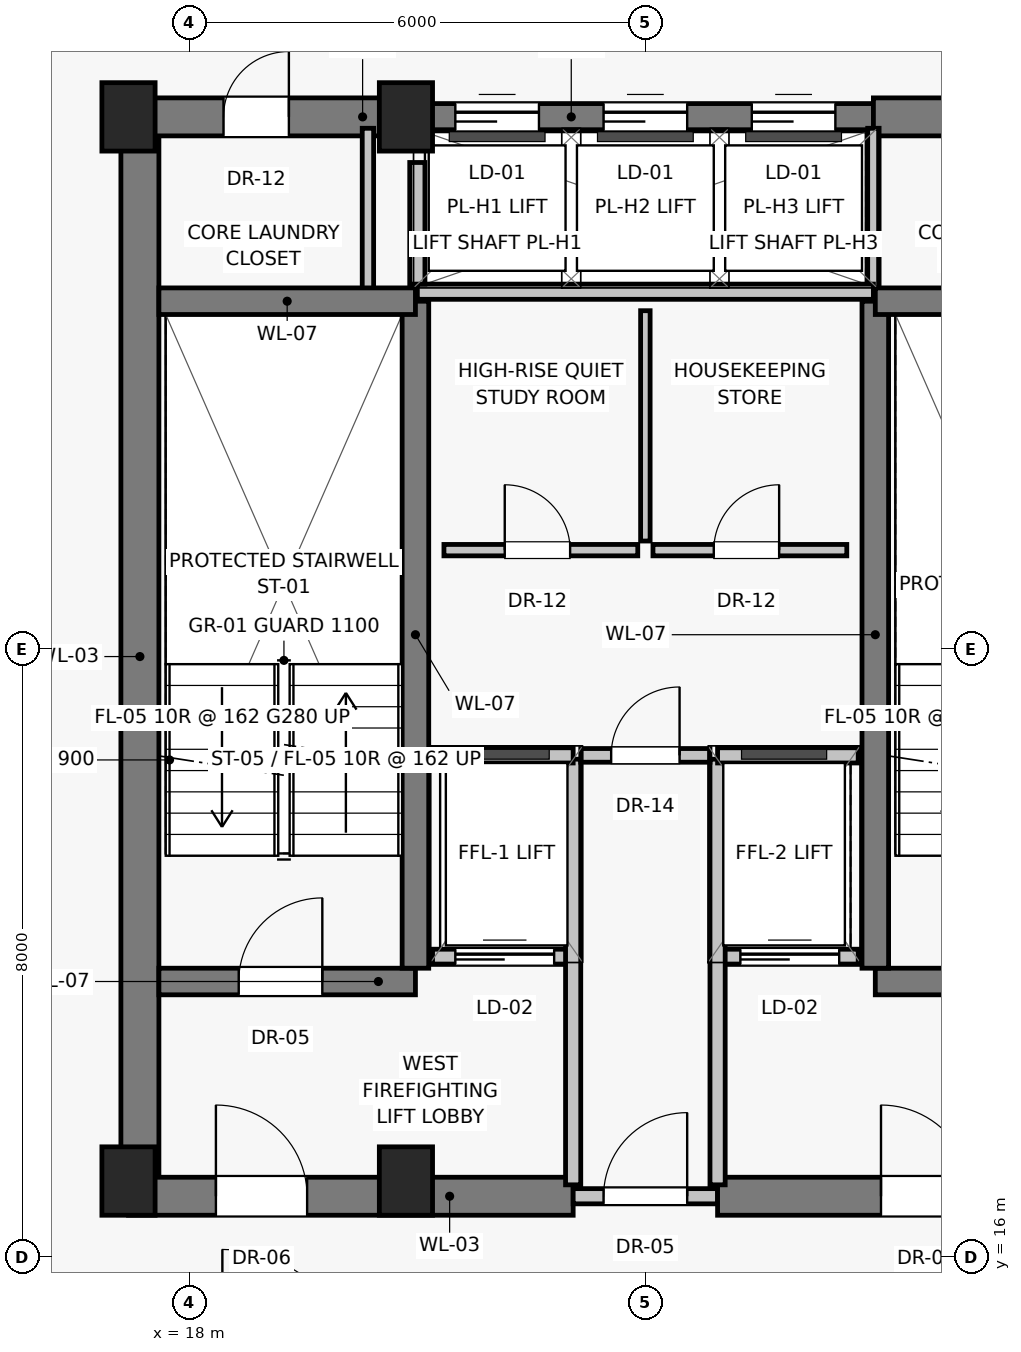
"""IFC4 building model, lengths in metres.
Left out: names, types, materials, properties, quantities, classifications, styles, units other than length and angle.
Written with IfcOpenShell. Run it as: python <this file> out.ifc"""

import sys

from ifc_helpers import new_model, si_unit, direction, frame, frame_2d, origin, origin_2d, place, context, subcontext, project, spatial, rectangle, extrude, source, transform, mapped, element, fill, save


model = new_model("IFC4")
c1 = context("Model", 3, precision=1e-05, world=origin(), true_north=direction((0.0, 1.0)))
c2 = subcontext(c1, "Body", "Model", "MODEL_VIEW")
j1 = project(units=[si_unit("LENGTHUNIT", "METRE"), si_unit("PLANEANGLEUNIT", "RADIAN")], contexts=[c1])
p1 = place(None, origin())
s1 = spatial("IfcSite", under=j1, at=p1, CompositionType="ELEMENT")
p2 = place(p1, origin())
s2 = spatial("IfcBuilding", under=s1, at=p2, CompositionType="ELEMENT")
p3 = place(p2, frame((0.0, 0.0, 251.25)))
s3 = spatial("IfcBuildingStorey", under=s2, at=p3, CompositionType="ELEMENT", Elevation=251.25)
for number, where, z_axis, x_axis in (
    (1, (17.2, 17.0, 0.0), (0.0, 0.0, 1.0), (1.0, 0.0, 0.0)),
    (2, (20.85, 17.0, 0.0), (0.0, 0.0, 1.0), (1.0, 0.0, 0.0)),
    (3, (17.2, 31.0, 0.0), (0.0, 0.0, 1.0), (1.0, 0.0, 0.0)),
    (4, (20.85, 31.0, 0.0), (0.0, 0.0, 1.0), (1.0, 0.0, 0.0)),
):
    element("IfcColumn", number, at=place(p3, frame(where, z_axis=z_axis, x_axis=x_axis)), inside=s3, PredefinedType="PILASTER", context=c2, shape_type="SweptSolid", body=[
        extrude(rectangle(XDim=0.7, YDim=0.9, at=origin_2d()), origin(), (0.0, 0.0, 1.0), 3.25),
    ])
p4 = place(p3, frame((17.35, 16.8, 0.0), z_axis=(0.0, 0.0, 1.0), x_axis=(0.0, 1.0, 0.0)))
e5 = element("IfcWall", 5, at=p4, inside=s3, PredefinedType="SHEAR", context=c2, shape_type="SweptSolid", body=[
    extrude(rectangle(XDim=14.2, YDim=0.5, at=frame_2d((7.1, 0.0))), origin(), (0.0, 0.0, 1.0), 3.015),
])
p5 = place(p3, frame((17.2, 16.8, 0.0), z_axis=(0.0, 0.0, 1.0), x_axis=(1.0, 0.0, 0.0)))
e6 = element("IfcWall", 6, at=p5, inside=s3, PredefinedType="SHEAR", context=c2, shape_type="SweptSolid", body=[
    extrude(rectangle(XDim=5.85, YDim=0.5, at=frame_2d((2.925, 0.0))), origin(), (0.0, 0.0, 1.0), 3.015),
])
p6 = place(p5, frame((1.15, 0.0, 0.0)))
e7 = element("IfcOpeningElement", 7, at=p6, cuts=e6, PredefinedType="OPENING", context=c2, shape_type="SweptSolid", body=[
    extrude(rectangle(XDim=1.2, YDim=2.03, at=frame_2d((0.6, 1.015))), frame((0.0, 0.26, 0.0), z_axis=(0.0, -1.0, 0.0), x_axis=(1.0, 0.0, 0.0)), (0.0, 0.0, 1.0), 0.52),
])
p7 = place(p3, frame((23.05, 16.8, 0.0), z_axis=(0.0, 0.0, 1.0), x_axis=(1.0, 0.0, 0.0)))
e8 = element("IfcWall", 8, at=p7, inside=s3, PredefinedType="SOLIDWALL", context=c2, shape_type="SweptSolid", body=[
    extrude(rectangle(XDim=1.9, YDim=0.2, at=frame_2d((0.95, 0.0))), origin(), (0.0, 0.0, 1.0), 2.165),
])
p8 = place(p7, frame((0.4, 0.0, 0.0)))
e9 = element("IfcOpeningElement", 9, at=p8, cuts=e8, PredefinedType="OPENING", context=c2, shape_type="SweptSolid", body=[
    extrude(rectangle(XDim=1.1, YDim=2.03, at=frame_2d((0.55, 1.015))), frame((0.0, 0.11, 0.0), z_axis=(0.0, -1.0, 0.0), x_axis=(1.0, 0.0, 0.0)), (0.0, 0.0, 1.0), 0.22),
])
p9 = place(p3, frame((24.95, 16.8, 0.0), z_axis=(0.0, 0.0, 1.0), x_axis=(1.0, 0.0, 0.0)))
e10 = element("IfcWall", 10, at=p9, inside=s3, PredefinedType="SHEAR", context=c2, shape_type="SweptSolid", body=[
    extrude(rectangle(XDim=5.85, YDim=0.5, at=frame_2d((2.925, 0.0))), origin(), (0.0, 0.0, 1.0), 3.015),
])
p10 = place(p9, frame((2.15, 0.0, 0.0)))
e11 = element("IfcOpeningElement", 11, at=p10, cuts=e10, PredefinedType="OPENING", context=c2, shape_type="SweptSolid", body=[
    extrude(rectangle(XDim=1.2, YDim=2.03, at=frame_2d((0.6, 1.015))), frame((0.0, 0.26, 0.0), z_axis=(0.0, -1.0, 0.0), x_axis=(1.0, 0.0, 0.0)), (0.0, 0.0, 1.0), 0.52),
])
p11 = place(p3, frame((17.2, 31.0, 0.0), z_axis=(0.0, 0.0, 1.0), x_axis=(1.0, 0.0, 0.0)))
e12 = element("IfcWall", 12, at=p11, inside=s3, PredefinedType="SHEAR", context=c2, shape_type="SweptSolid", body=[
    extrude(rectangle(XDim=3.8, YDim=0.5, at=frame_2d((1.9, 0.0))), origin(), (0.0, 0.0, 1.0), 3.015),
])
p12 = place(p11, frame((1.25, 0.0, 0.0)))
e13 = element("IfcOpeningElement", 13, at=p12, cuts=e12, PredefinedType="OPENING", context=c2, shape_type="SweptSolid", body=[
    extrude(rectangle(XDim=0.86, YDim=2.01, at=frame_2d((0.43, 1.005))), frame((0.0, 0.26, 0.0), z_axis=(0.0, -1.0, 0.0), x_axis=(1.0, 0.0, 0.0)), (0.0, 0.0, 1.0), 0.52),
])
p13 = place(p3, frame((21.0, 31.0, 0.0), z_axis=(0.0, 0.0, 1.0), x_axis=(1.0, 0.0, 0.0)))
e14 = element("IfcWall", 14, at=p13, inside=s3, PredefinedType="SHEAR", context=c2, shape_type="SweptSolid", body=[
    extrude(rectangle(XDim=6.0, YDim=0.35, at=frame_2d((3.0, 0.0))), origin(), (0.0, 0.0, 1.0), 3.015),
])
p14 = place(p13, frame((0.5, 0.0, 0.0)))
e15 = element("IfcOpeningElement", 15, at=p14, cuts=e14, PredefinedType="OPENING", context=c2, shape_type="SweptSolid", body=[
    extrude(rectangle(XDim=1.1, YDim=2.08, at=frame_2d((0.55, 1.04))), frame((0.0, 0.185, 0.0), z_axis=(0.0, -1.0, 0.0), x_axis=(1.0, 0.0, 0.0)), (0.0, 0.0, 1.0), 0.37),
])
p15 = place(p13, frame((2.45, 0.0, 0.0)))
e16 = element("IfcOpeningElement", 16, at=p15, cuts=e14, PredefinedType="OPENING", context=c2, shape_type="SweptSolid", body=[
    extrude(rectangle(XDim=1.1, YDim=2.08, at=frame_2d((0.55, 1.04))), frame((0.0, 0.185, 0.0), z_axis=(0.0, -1.0, 0.0), x_axis=(1.0, 0.0, 0.0)), (0.0, 0.0, 1.0), 0.37),
])
p16 = place(p13, frame((4.4, 0.0, 0.0)))
e17 = element("IfcOpeningElement", 17, at=p16, cuts=e14, PredefinedType="OPENING", context=c2, shape_type="SweptSolid", body=[
    extrude(rectangle(XDim=1.1, YDim=2.08, at=frame_2d((0.55, 1.04))), frame((0.0, 0.185, 0.0), z_axis=(0.0, -1.0, 0.0), x_axis=(1.0, 0.0, 0.0)), (0.0, 0.0, 1.0), 0.37),
])
p17 = place(p3, frame((27.0, 31.0, 0.0), z_axis=(0.0, 0.0, 1.0), x_axis=(1.0, 0.0, 0.0)))
e18 = element("IfcWall", 18, at=p17, inside=s3, PredefinedType="SHEAR", context=c2, shape_type="SweptSolid", body=[
    extrude(rectangle(XDim=3.8, YDim=0.5, at=frame_2d((1.9, 0.0))), origin(), (0.0, 0.0, 1.0), 3.015),
])
p18 = place(p17, frame((1.15, 0.0, 0.0)))
e19 = element("IfcOpeningElement", 19, at=p18, cuts=e18, PredefinedType="OPENING", context=c2, shape_type="SweptSolid", body=[
    extrude(rectangle(XDim=1.0, YDim=2.01, at=frame_2d((0.5, 1.005))), frame((0.0, 0.26, 0.0), z_axis=(0.0, -1.0, 0.0), x_axis=(1.0, 0.0, 0.0)), (0.0, 0.0, 1.0), 0.52),
])
for number, where, z_axis, x_axis in (
    (20, (20.35, 28.65, 0.0), (0.0, 0.0, 1.0), (0.0, 1.0, 0.0)),
    (21, (27.0, 28.65, 0.0), (0.0, 0.0, 1.0), (0.0, 1.0, 0.0)),
):
    element("IfcWall", number, at=place(p3, frame(where, z_axis=z_axis, x_axis=x_axis)), inside=s3, PredefinedType="PARTITIONING", context=c2, shape_type="SweptSolid", body=[
        extrude(rectangle(XDim=2.2, YDim=0.15, at=frame_2d((1.1, 0.0))), origin(), (0.0, 0.0, 1.0), 3.015),
    ])
p19 = place(p3, frame((17.6, 19.625, 0.0), z_axis=(0.0, 0.0, 1.0), x_axis=(1.0, 0.0, 0.0)))
e22 = element("IfcWall", 22, at=p19, inside=s3, PredefinedType="SHEAR", context=c2, shape_type="SweptSolid", body=[
    extrude(rectangle(XDim=3.375, YDim=0.35, at=frame_2d((1.688, 0.0))), origin(), (0.0, 0.0, 1.0), 3.015),
])
p20 = place(p19, frame((1.05, 0.0, 0.0)))
e23 = element("IfcOpeningElement", 23, at=p20, cuts=e22, PredefinedType="OPENING", context=c2, shape_type="SweptSolid", body=[
    extrude(rectangle(XDim=1.1, YDim=2.03, at=frame_2d((0.55, 1.015))), frame((0.0, 0.185, 0.0), z_axis=(0.0, -1.0, 0.0), x_axis=(1.0, 0.0, 0.0)), (0.0, 0.0, 1.0), 0.37),
])
p21 = place(p3, frame((21.2, 19.95, 0.0), z_axis=(0.0, 0.0, 1.0), x_axis=(1.0, 0.0, 0.0)))
e24 = element("IfcWall", 24, at=p21, inside=s3, PredefinedType="SOLIDWALL", context=c2, shape_type="SweptSolid", body=[
    extrude(rectangle(XDim=1.85, YDim=0.2, at=frame_2d((0.925, 0.0))), origin(), (0.0, 0.0, 1.0), 3.015),
])
p22 = place(p21, frame((0.3, 0.0, 0.0)))
e25 = element("IfcOpeningElement", 25, at=p22, cuts=e24, PredefinedType="OPENING", context=c2, shape_type="SweptSolid", body=[
    extrude(rectangle(XDim=1.3, YDim=2.25, at=frame_2d((0.65, 1.125))), frame((0.0, 0.11, 0.0), z_axis=(0.0, -1.0, 0.0), x_axis=(1.0, 0.0, 0.0)), (0.0, 0.0, 1.0), 0.22),
])
p23 = place(p3, frame((24.95, 19.95, 0.0), z_axis=(0.0, 0.0, 1.0), x_axis=(1.0, 0.0, 0.0)))
e26 = element("IfcWall", 26, at=p23, inside=s3, PredefinedType="SOLIDWALL", context=c2, shape_type="SweptSolid", body=[
    extrude(rectangle(XDim=1.85, YDim=0.2, at=frame_2d((0.925, 0.0))), origin(), (0.0, 0.0, 1.0), 3.015),
])
p24 = place(p23, frame((0.3, 0.0, 0.0)))
e27 = element("IfcOpeningElement", 27, at=p24, cuts=e26, PredefinedType="OPENING", context=c2, shape_type="SweptSolid", body=[
    extrude(rectangle(XDim=1.3, YDim=2.25, at=frame_2d((0.65, 1.125))), frame((0.0, 0.11, 0.0), z_axis=(0.0, -1.0, 0.0), x_axis=(1.0, 0.0, 0.0)), (0.0, 0.0, 1.0), 0.22),
])
p25 = place(p3, frame((27.025, 19.625, 0.0), z_axis=(0.0, 0.0, 1.0), x_axis=(1.0, 0.0, 0.0)))
e28 = element("IfcWall", 28, at=p25, inside=s3, PredefinedType="SHEAR", context=c2, shape_type="SweptSolid", body=[
    extrude(rectangle(XDim=3.375, YDim=0.35, at=frame_2d((1.688, 0.0))), origin(), (0.0, 0.0, 1.0), 3.015),
])
p26 = place(p25, frame((1.05, 0.0, 0.0)))
e29 = element("IfcOpeningElement", 29, at=p26, cuts=e28, PredefinedType="OPENING", context=c2, shape_type="SweptSolid", body=[
    extrude(rectangle(XDim=1.1, YDim=2.03, at=frame_2d((0.55, 1.015))), frame((0.0, 0.185, 0.0), z_axis=(0.0, -1.0, 0.0), x_axis=(1.0, 0.0, 0.0)), (0.0, 0.0, 1.0), 0.37),
])
for number, where, z_axis, x_axis in (
    (30, (20.975, 19.8, 0.0), (0.0, 0.0, 1.0), (0.0, 1.0, 0.0)),
    (31, (27.025, 19.8, 0.0), (0.0, 0.0, 1.0), (0.0, 1.0, 0.0)),
):
    element("IfcWall", number, at=place(p3, frame(where, z_axis=z_axis, x_axis=x_axis)), inside=s3, PredefinedType="SHEAR", context=c2, shape_type="SweptSolid", body=[
        extrude(rectangle(XDim=8.775, YDim=0.35, at=frame_2d((4.387, 0.0))), origin(), (0.0, 0.0, 1.0), 3.015),
    ])
for number, where, z_axis, x_axis in (
    (32, (17.6, 28.575, 0.0), (0.0, 0.0, 1.0), (1.0, 0.0, 0.0)),
    (33, (27.025, 28.575, 0.0), (0.0, 0.0, 1.0), (1.0, 0.0, 0.0)),
):
    element("IfcWall", number, at=place(p3, frame(where, z_axis=z_axis, x_axis=x_axis)), inside=s3, PredefinedType="SHEAR", context=c2, shape_type="SweptSolid", body=[
        extrude(rectangle(XDim=3.375, YDim=0.35, at=frame_2d((1.688, 0.0))), origin(), (0.0, 0.0, 1.0), 3.015),
    ])
for number, where, z_axis, x_axis in (
    (34, (23.05, 16.95, 0.0), (0.0, 0.0, 1.0), (0.0, 1.0, 0.0)),
    (35, (24.95, 16.95, 0.0), (0.0, 0.0, 1.0), (0.0, 1.0, 0.0)),
):
    element("IfcWall", number, at=place(p3, frame(where, z_axis=z_axis, x_axis=x_axis)), inside=s3, PredefinedType="SOLIDWALL", context=c2, shape_type="SweptSolid", body=[
        extrude(rectangle(XDim=5.6, YDim=0.2, at=frame_2d((2.8, 0.0))), origin(), (0.0, 0.0, 1.0), 3.015),
    ])
for number, where, z_axis, x_axis in (
    (36, (21.2, 22.6, 0.0), (0.0, 0.0, 1.0), (1.0, 0.0, 0.0)),
    (37, (24.95, 22.6, 0.0), (0.0, 0.0, 1.0), (1.0, 0.0, 0.0)),
):
    element("IfcWall", number, at=place(p3, frame(where, z_axis=z_axis, x_axis=x_axis)), inside=s3, PredefinedType="SOLIDWALL", context=c2, shape_type="SweptSolid", body=[
        extrude(rectangle(XDim=1.85, YDim=0.2, at=frame_2d((0.925, 0.0))), origin(), (0.0, 0.0, 1.0), 3.015),
    ])
p27 = place(p3, frame((21.0, 28.7, 0.0), z_axis=(0.0, 0.0, 1.0), x_axis=(1.0, 0.0, 0.0)))
e38 = element("IfcWall", 38, at=p27, inside=s3, PredefinedType="SOLIDWALL", context=c2, shape_type="SweptSolid", body=[
    extrude(rectangle(XDim=6.0, YDim=0.2, at=frame_2d((3.0, 0.0))), origin(), (0.0, 0.0, 1.0), 3.015),
])
p28 = place(p3, frame((21.0, 28.8, 0.0), z_axis=(0.0, 0.0, 1.0), x_axis=(0.0, 1.0, 0.0)))
e39 = element("IfcWall", 39, at=p28, inside=s3, PredefinedType="SOLIDWALL", context=c2, shape_type="SweptSolid", body=[
    extrude(rectangle(XDim=1.6, YDim=0.2, at=frame_2d((0.8, 0.0))), origin(), (0.0, 0.0, 1.0), 3.015),
])
p29 = place(p3, frame((23.15, 22.6, 0.0), z_axis=(0.0, 0.0, 1.0), x_axis=(1.0, 0.0, 0.0)))
e40 = element("IfcWall", 40, at=p29, inside=s3, PredefinedType="PARTITIONING", context=c2, shape_type="SweptSolid", body=[
    extrude(rectangle(XDim=1.7, YDim=0.18, at=frame_2d((0.85, 0.0))), origin(), (0.0, 0.0, 1.0), 3.015),
])
p30 = place(p29, frame((0.4, 0.0, 0.0)))
e41 = element("IfcOpeningElement", 41, at=p30, cuts=e40, PredefinedType="OPENING", context=c2, shape_type="SweptSolid", body=[
    extrude(rectangle(XDim=0.9, YDim=2.01, at=frame_2d((0.45, 1.005))), frame((0.0, 0.1, 0.0), z_axis=(0.0, -1.0, 0.0), x_axis=(1.0, 0.0, 0.0)), (0.0, 0.0, 1.0), 0.2),
])
p31 = place(p3, frame((21.35, 25.3, 0.0), z_axis=(0.0, 0.0, 1.0), x_axis=(1.0, 0.0, 0.0)))
e42 = element("IfcWall", 42, at=p31, inside=s3, PredefinedType="PARTITIONING", context=c2, shape_type="SweptSolid", body=[
    extrude(rectangle(XDim=2.55, YDim=0.15, at=frame_2d((1.275, 0.0))), origin(), (0.0, 0.0, 1.0), 3.015),
])
p32 = place(p31, frame((0.8, 0.0, 0.0)))
e43 = element("IfcOpeningElement", 43, at=p32, cuts=e42, PredefinedType="OPENING", context=c2, shape_type="SweptSolid", body=[
    extrude(rectangle(XDim=0.86, YDim=2.01, at=frame_2d((0.43, 1.005))), frame((0.0, 0.085, 0.0), z_axis=(0.0, -1.0, 0.0), x_axis=(1.0, 0.0, 0.0)), (0.0, 0.0, 1.0), 0.17),
])
p33 = place(p3, frame((24.1, 25.3, 0.0), z_axis=(0.0, 0.0, 1.0), x_axis=(1.0, 0.0, 0.0)))
e44 = element("IfcWall", 44, at=p33, inside=s3, PredefinedType="PARTITIONING", context=c2, shape_type="SweptSolid", body=[
    extrude(rectangle(XDim=2.55, YDim=0.15, at=frame_2d((1.275, 0.0))), origin(), (0.0, 0.0, 1.0), 3.015),
])
p34 = place(p33, frame((0.8, 0.0, 0.0)))
e45 = element("IfcOpeningElement", 45, at=p34, cuts=e44, PredefinedType="OPENING", context=c2, shape_type="SweptSolid", body=[
    extrude(rectangle(XDim=0.86, YDim=2.01, at=frame_2d((0.43, 1.005))), frame((0.0, 0.085, 0.0), z_axis=(0.0, -1.0, 0.0), x_axis=(1.0, 0.0, 0.0)), (0.0, 0.0, 1.0), 0.17),
])
p35 = place(p3, frame((24.0, 25.42, 0.0), z_axis=(0.0, 0.0, 1.0), x_axis=(0.0, 1.0, 0.0)))
e46 = element("IfcWall", 46, at=p35, inside=s3, PredefinedType="PARTITIONING", context=c2, shape_type="SweptSolid", body=[
    extrude(rectangle(XDim=3.03, YDim=0.125, at=frame_2d((1.515, 0.0))), origin(), (0.0, 0.0, 1.0), 3.015),
])
m1 = source(origin(), c2, "Body", "SweptSolid", [
    extrude(rectangle(XDim=1.2, YDim=2.03, at=frame_2d((0.6, 1.015))), frame((0.0, 0.025, 0.0), z_axis=(0.0, -1.0, 0.0), x_axis=(1.0, 0.0, 0.0)), (0.0, 0.0, 1.0), 0.05),
])
p36 = place(p6, origin())
e47 = element("IfcDoor", 47, at=p36, inside=s3, OperationType="SINGLE_SWING_LEFT", PredefinedType="DOOR", context=c2, shape_type="MappedRepresentation", body=[
    mapped(m1, transform((0.0, 0.0, 0.0), scale=1.0)),
])
fill(e7, e47)
m2 = source(origin(), c2, "Body", "SweptSolid", [
    extrude(rectangle(XDim=1.1, YDim=2.03, at=frame_2d((0.55, 1.015))), frame((0.0, 0.025, 0.0), z_axis=(0.0, -1.0, 0.0), x_axis=(1.0, 0.0, 0.0)), (0.0, 0.0, 1.0), 0.05),
])
p37 = place(p8, origin())
e48 = element("IfcDoor", 48, at=p37, inside=s3, OperationType="SINGLE_SWING_RIGHT", PredefinedType="DOOR", context=c2, shape_type="MappedRepresentation", body=[
    mapped(m2, transform((0.0, 0.0, 0.0), scale=1.0)),
])
fill(e9, e48)
p38 = place(p10, origin())
e49 = element("IfcDoor", 49, at=p38, inside=s3, OperationType="SINGLE_SWING_LEFT", PredefinedType="DOOR", context=c2, shape_type="MappedRepresentation", body=[
    mapped(m1, transform((0.0, 0.0, 0.0), scale=1.0)),
])
fill(e11, e49)
m3 = source(origin(), c2, "Body", "SweptSolid", [
    extrude(rectangle(XDim=0.86, YDim=2.01, at=frame_2d((0.43, 1.005))), frame((0.0, 0.025, 0.0), z_axis=(0.0, -1.0, 0.0), x_axis=(1.0, 0.0, 0.0)), (0.0, 0.0, 1.0), 0.05),
])
p39 = place(p12, origin())
e50 = element("IfcDoor", 50, at=p39, inside=s3, OperationType="SINGLE_SWING_RIGHT", PredefinedType="DOOR", context=c2, shape_type="MappedRepresentation", body=[
    mapped(m3, transform((0.0, 0.0, 0.0), scale=1.0)),
])
fill(e13, e50)
m4 = source(origin(), c2, "Body", "SweptSolid", [
    extrude(rectangle(XDim=1.1, YDim=2.08, at=frame_2d((0.55, 1.04))), frame((0.0, 0.025, 0.0), z_axis=(0.0, -1.0, 0.0), x_axis=(1.0, 0.0, 0.0)), (0.0, 0.0, 1.0), 0.05),
])
p40 = place(p14, origin())
e51 = element("IfcDoor", 51, at=p40, inside=s3, OperationType="SLIDING_TO_LEFT", PredefinedType="DOOR", context=c2, shape_type="MappedRepresentation", body=[
    mapped(m4, transform((0.0, 0.0, 0.0), scale=1.0)),
])
fill(e15, e51)
p41 = place(p15, origin())
e52 = element("IfcDoor", 52, at=p41, inside=s3, OperationType="SLIDING_TO_LEFT", PredefinedType="DOOR", context=c2, shape_type="MappedRepresentation", body=[
    mapped(m4, transform((0.0, 0.0, 0.0), scale=1.0)),
])
fill(e16, e52)
p42 = place(p16, origin())
e53 = element("IfcDoor", 53, at=p42, inside=s3, OperationType="SLIDING_TO_LEFT", PredefinedType="DOOR", context=c2, shape_type="MappedRepresentation", body=[
    mapped(m4, transform((0.0, 0.0, 0.0), scale=1.0)),
])
fill(e17, e53)
p43 = place(p20, origin())
e54 = element("IfcDoor", 54, at=p43, inside=s3, OperationType="SINGLE_SWING_RIGHT", PredefinedType="DOOR", context=c2, shape_type="MappedRepresentation", body=[
    mapped(m2, transform((0.0, 0.0, 0.0), scale=1.0)),
])
fill(e23, e54)
m5 = source(origin(), c2, "Body", "SweptSolid", [
    extrude(rectangle(XDim=1.3, YDim=2.25, at=frame_2d((0.65, 1.125))), frame((0.0, 0.025, 0.0), z_axis=(0.0, -1.0, 0.0), x_axis=(1.0, 0.0, 0.0)), (0.0, 0.0, 1.0), 0.05),
])
p44 = place(p22, origin())
e55 = element("IfcDoor", 55, at=p44, inside=s3, OperationType="SLIDING_TO_LEFT", PredefinedType="DOOR", context=c2, shape_type="MappedRepresentation", body=[
    mapped(m5, transform((0.0, 0.0, 0.0), scale=1.0)),
])
fill(e25, e55)
p45 = place(p24, origin())
e56 = element("IfcDoor", 56, at=p45, inside=s3, OperationType="SLIDING_TO_LEFT", PredefinedType="DOOR", context=c2, shape_type="MappedRepresentation", body=[
    mapped(m5, transform((0.0, 0.0, 0.0), scale=1.0)),
])
fill(e27, e56)
m6 = source(origin(), c2, "Body", "SweptSolid", [
    extrude(rectangle(XDim=0.9, YDim=2.01, at=frame_2d((0.45, 1.005))), frame((0.0, 0.025, 0.0), z_axis=(0.0, -1.0, 0.0), x_axis=(1.0, 0.0, 0.0)), (0.0, 0.0, 1.0), 0.05),
])
p46 = place(p30, origin())
e57 = element("IfcDoor", 57, at=p46, inside=s3, OperationType="SINGLE_SWING_RIGHT", PredefinedType="DOOR", context=c2, shape_type="MappedRepresentation", body=[
    mapped(m6, transform((0.0, 0.0, 0.0), scale=1.0)),
])
fill(e41, e57)
p47 = place(p32, origin())
e58 = element("IfcDoor", 58, at=p47, inside=s3, OperationType="SINGLE_SWING_LEFT", PredefinedType="DOOR", context=c2, shape_type="MappedRepresentation", body=[
    mapped(m3, transform((0.0, 0.0, 0.0), scale=1.0)),
])
fill(e43, e58)
p48 = place(p34, origin())
e59 = element("IfcDoor", 59, at=p48, inside=s3, OperationType="SINGLE_SWING_RIGHT", PredefinedType="DOOR", context=c2, shape_type="MappedRepresentation", body=[
    mapped(m3, transform((0.0, 0.0, 0.0), scale=1.0)),
])
fill(e45, e59)
save(model, sys.argv[1])
